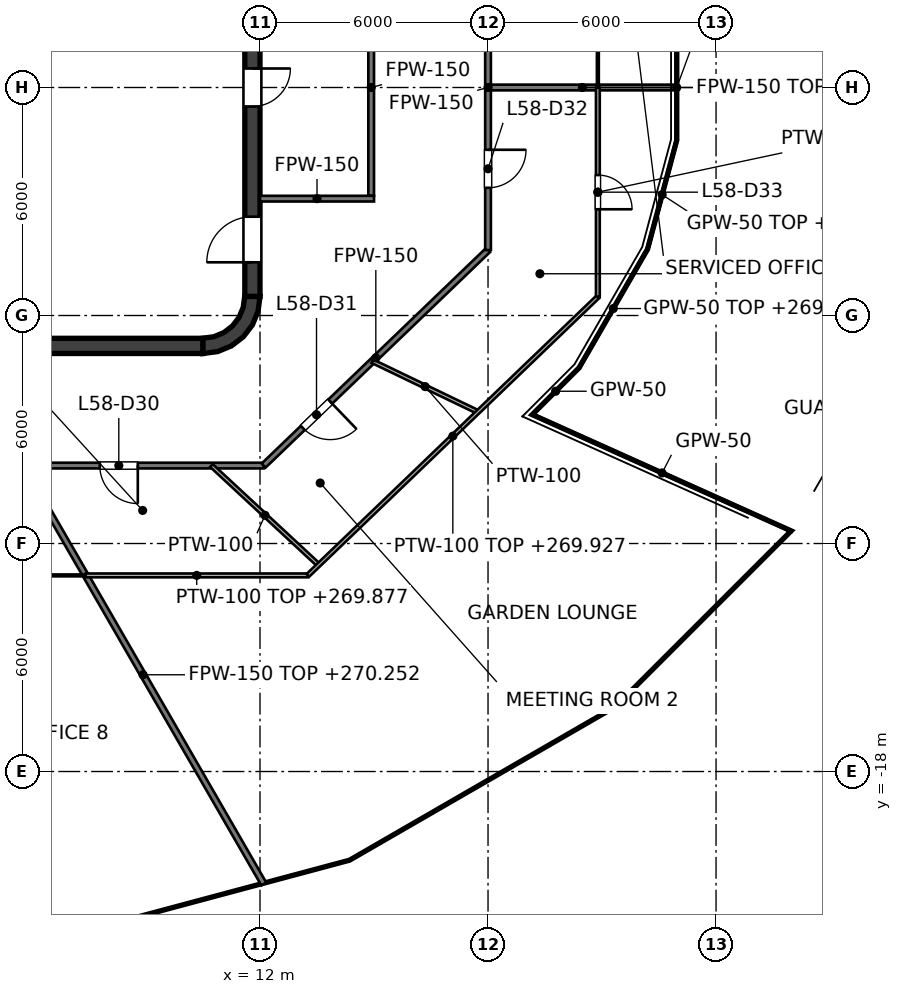
"""IFC4 building model, lengths in metres.
Left out: names, types, materials, properties, quantities, classifications, styles, units other than length and angle.
Written with IfcOpenShell. Run it as: python <this file> out.ifc"""

import sys

from ifc_helpers import new_model, si_unit, direction, frame, frame_2d, origin, place, context, subcontext, project, spatial, polyline, rectangle, outline, extrude, element, fill, save


model = new_model("IFC4")
c1 = context("Model", 3, precision=1e-05, world=origin(), true_north=direction((0.0, 1.0)))
c2 = subcontext(c1, "Body", "Model", "MODEL_VIEW")
j1 = project(units=[si_unit("LENGTHUNIT", "METRE"), si_unit("PLANEANGLEUNIT", "RADIAN")], contexts=[c1])
p1 = place(None, origin())
s1 = spatial("IfcSite", under=j1, at=p1, CompositionType="ELEMENT")
p2 = place(p1, origin())
s2 = spatial("IfcBuilding", under=s1, at=p2, CompositionType="ELEMENT")
p3 = place(p2, frame((0.0, 0.0, 267.0)))
s3 = spatial("IfcBuildingStorey", under=s2, at=p3, CompositionType="ELEMENT", Elevation=267.0)
p4 = place(p3, frame((-10.5, -6.8, 0.0), z_axis=(0.0, 0.0, 1.0), x_axis=(1.0, 0.0, 0.0)))
e1 = element("IfcWall", 1, at=p4, inside=s3, PredefinedType="SHEAR", context=c2, shape_type="SweptSolid", body=[
    extrude(rectangle(XDim=21.0, YDim=0.4, at=frame_2d((10.5, 0.0))), origin(), (0.0, 0.0, 1.0), 4.0),
])
p5 = place(p3, frame((11.8, -5.5, 0.0), z_axis=(0.0, 0.0, 1.0), x_axis=(0.0, 1.0, 0.0)))
e2 = element("IfcWall", 2, at=p5, inside=s3, PredefinedType="SHEAR", context=c2, shape_type="SweptSolid", body=[
    extrude(rectangle(XDim=11.0, YDim=0.4, at=frame_2d((5.5, 0.0))), origin(), (0.0, 0.0, 1.0), 4.0),
])
p6 = place(p5, frame((5.0, 0.0, 0.0)))
e3 = element("IfcOpeningElement", 3, at=p6, cuts=e2, PredefinedType="OPENING", context=c2, shape_type="SweptSolid", body=[
    extrude(rectangle(XDim=1.0, YDim=2.1, at=frame_2d((0.5, 1.05))), frame((0.0, 0.2, 0.0), z_axis=(0.0, -1.0, 0.0), x_axis=(1.0, 0.0, 0.0)), (0.0, 0.0, 1.0), 0.4),
])
p7 = place(p5, frame((0.9, 0.0, 0.0)))
e4 = element("IfcOpeningElement", 4, at=p7, cuts=e2, PredefinedType="OPENING", context=c2, shape_type="SweptSolid", body=[
    extrude(rectangle(XDim=1.2, YDim=2.1, at=frame_2d((0.6, 1.05))), frame((0.0, 0.2, 0.0), z_axis=(0.0, -1.0, 0.0), x_axis=(1.0, 0.0, 0.0)), (0.0, 0.0, 1.0), 0.4),
])
p8 = place(p5, frame((8.9, 0.0, 0.0)))
e5 = element("IfcOpeningElement", 5, at=p8, cuts=e2, PredefinedType="OPENING", context=c2, shape_type="SweptSolid", body=[
    extrude(rectangle(XDim=1.2, YDim=2.1, at=frame_2d((0.6, 1.05))), frame((0.0, 0.2, 0.0), z_axis=(0.0, -1.0, 0.0), x_axis=(1.0, 0.0, 0.0)), (0.0, 0.0, 1.0), 0.4),
])
p9 = place(p3, origin())
e6 = element("IfcWall", 6, at=p9, inside=s3, PredefinedType="SHEAR", context=c2, shape_type="SweptSolid", body=[
    extrude(outline(polyline([(12.0, -5.5), (11.596, -5.5), (11.559, -5.784), (11.45, -6.048), (11.275, -6.275), (11.048, -6.45), (10.784, -6.559), (10.5, -6.596), (10.5, -7.0), (10.888, -6.949), (11.25, -6.799), (11.561, -6.561), (11.799, -6.25), (11.949, -5.888), (12.0, -5.5)])), origin(), (0.0, 0.0, 1.0), 4.0),
])
p10 = place(p3, frame((9.0, -6.6, 0.0), z_axis=(0.0, 0.0, 1.0), x_axis=(0.0, 1.0, 0.0)))
e7 = element("IfcWall", 7, at=p10, inside=s3, PredefinedType="SOLIDWALL", context=c2, shape_type="SweptSolid", body=[
    extrude(rectangle(XDim=2.5, YDim=0.25, at=frame_2d((1.25, 0.0))), origin(), (0.0, 0.0, 1.0), 3.85),
])
p11 = place(p10, frame((0.65, 0.0, 0.0)))
e8 = element("IfcOpeningElement", 8, at=p11, cuts=e7, PredefinedType="OPENING", context=c2, shape_type="SweptSolid", body=[
    extrude(rectangle(XDim=1.2, YDim=2.1, at=frame_2d((0.6, 1.05))), frame((0.0, 0.125, 0.0), z_axis=(0.0, -1.0, 0.0), x_axis=(1.0, 0.0, 0.0)), (0.0, 0.0, 1.0), 0.25),
])
p12 = place(p3, frame((-9.125, -1.525, 0.0), z_axis=(0.0, 0.0, 1.0), x_axis=(1.0, 0.0, 0.0)))
e9 = element("IfcWall", 9, at=p12, inside=s3, PredefinedType="SOLIDWALL", context=c2, shape_type="SweptSolid", body=[
    extrude(rectangle(XDim=18.25, YDim=0.25, at=frame_2d((9.125, 0.0))), origin(), (0.0, 0.0, 1.0), 3.85),
])
p13 = place(p12, frame((7.15, 0.0, 0.0)))
e10 = element("IfcOpeningElement", 10, at=p13, cuts=e9, PredefinedType="OPENING", context=c2, shape_type="SweptSolid", body=[
    extrude(rectangle(XDim=1.2, YDim=2.1, at=frame_2d((0.6, 1.05))), frame((0.0, 0.125, 0.0), z_axis=(0.0, -1.0, 0.0), x_axis=(1.0, 0.0, 0.0)), (0.0, 0.0, 1.0), 0.25),
])
p14 = place(p12, frame((10.2, 0.0, 0.0)))
e11 = element("IfcOpeningElement", 11, at=p14, cuts=e9, PredefinedType="OPENING", context=c2, shape_type="SweptSolid", body=[
    extrude(rectangle(XDim=1.2, YDim=2.1, at=frame_2d((0.6, 1.05))), frame((0.0, 0.125, 0.0), z_axis=(0.0, -1.0, 0.0), x_axis=(1.0, 0.0, 0.0)), (0.0, 0.0, 1.0), 0.25),
])
p15 = place(p12, frame((16.075, 0.0, 0.0)))
e12 = element("IfcOpeningElement", 12, at=p15, cuts=e9, PredefinedType="OPENING", context=c2, shape_type="SweptSolid", body=[
    extrude(rectangle(XDim=1.0, YDim=2.1, at=frame_2d((0.5, 1.05))), frame((0.0, 0.125, 0.0), z_axis=(0.0, -1.0, 0.0), x_axis=(1.0, 0.0, 0.0)), (0.0, 0.0, 1.0), 0.25),
])
p16 = place(p3, frame((3.275, -3.975, 0.0), z_axis=(0.0, 0.0, 1.0), x_axis=(1.0, 0.0, 0.0)))
e13 = element("IfcWall", 13, at=p16, inside=s3, PredefinedType="SOLIDWALL", context=c2, shape_type="SweptSolid", body=[
    extrude(rectangle(XDim=5.85, YDim=0.25, at=frame_2d((2.925, 0.0))), origin(), (0.0, 0.0, 1.0), 3.85),
])
p17 = place(p3, frame((9.0, -3.85, 0.0), z_axis=(0.0, 0.0, 1.0), x_axis=(0.0, 1.0, 0.0)))
e14 = element("IfcWall", 14, at=p17, inside=s3, PredefinedType="SOLIDWALL", context=c2, shape_type="SweptSolid", body=[
    extrude(rectangle(XDim=2.2, YDim=0.25, at=frame_2d((1.1, 0.0))), origin(), (0.0, 0.0, 1.0), 3.85),
])
p18 = place(p3, frame((14.925, -2.85, 0.0), z_axis=(0.0, 0.0, 1.0), x_axis=(0.0, 1.0, 0.0)))
e15 = element("IfcWall", 15, at=p18, inside=s3, PredefinedType="PARTITIONING", context=c2, shape_type="SweptSolid", body=[
    extrude(rectangle(XDim=5.7, YDim=0.15, at=frame_2d((2.85, 0.0))), origin(), (0.0, 0.0, 1.0), 2.918),
])
p19 = place(p3, frame((12.0, -2.925, 0.0), z_axis=(0.0, 0.0, 1.0), x_axis=(1.0, 0.0, 0.0)))
e16 = element("IfcWall", 16, at=p19, inside=s3, PredefinedType="PARTITIONING", context=c2, shape_type="SweptSolid", body=[
    extrude(rectangle(XDim=3.0, YDim=0.15, at=frame_2d((1.5, 0.0))), origin(), (0.0, 0.0, 1.0), 2.918),
])
p20 = place(p3, frame((5.744, -9.949, 0.0), z_axis=(0.0, 0.0, 1.0), x_axis=(0.499937454569, -0.866061511395, 0.0)))
e17 = element("IfcWall", 17, at=p20, inside=s3, PredefinedType="PARTITIONING", context=c2, shape_type="SweptSolid", body=[
    extrude(rectangle(XDim=12.713, YDim=0.15, at=frame_2d((6.356, 0.0))), origin(), (0.0, 0.0, 1.0), 3.252),
])
p21 = place(p3, frame((-12.095, -9.949, 0.0), z_axis=(0.0, 0.0, 1.0), x_axis=(1.0, 0.0, 0.0)))
e18 = element("IfcWall", 18, at=p21, inside=s3, PredefinedType="PARTITIONING", context=c2, shape_type="SweptSolid", body=[
    extrude(rectangle(XDim=24.19, YDim=0.15, at=frame_2d((12.095, 0.0))), origin(), (0.0, 0.0, 1.0), 2.877),
])
p22 = place(p21, frame((0.573, 0.0, 0.0)))
e19 = element("IfcOpeningElement", 19, at=p22, cuts=e18, PredefinedType="OPENING", context=c2, shape_type="SweptSolid", body=[
    extrude(rectangle(XDim=1.0, YDim=2.1, at=frame_2d((0.5, 1.05))), frame((0.0, 0.075, 0.0), z_axis=(0.0, -1.0, 0.0), x_axis=(1.0, 0.0, 0.0)), (0.0, 0.0, 1.0), 0.15),
])
p23 = place(p21, frame((5.966, 0.0, 0.0)))
e20 = element("IfcOpeningElement", 20, at=p23, cuts=e18, PredefinedType="OPENING", context=c2, shape_type="SweptSolid", body=[
    extrude(rectangle(XDim=1.0, YDim=2.1, at=frame_2d((0.5, 1.05))), frame((0.0, 0.075, 0.0), z_axis=(0.0, -1.0, 0.0), x_axis=(1.0, 0.0, 0.0)), (0.0, 0.0, 1.0), 0.15),
])
p24 = place(p21, frame((13.812, 0.0, 0.0)))
e21 = element("IfcOpeningElement", 21, at=p24, cuts=e18, PredefinedType="OPENING", context=c2, shape_type="SweptSolid", body=[
    extrude(rectangle(XDim=1.0, YDim=2.1, at=frame_2d((0.5, 1.05))), frame((0.0, 0.075, 0.0), z_axis=(0.0, -1.0, 0.0), x_axis=(1.0, 0.0, 0.0)), (0.0, 0.0, 1.0), 0.15),
])
p25 = place(p21, frame((19.879, 0.0, 0.0)))
e22 = element("IfcOpeningElement", 22, at=p25, cuts=e18, PredefinedType="OPENING", context=c2, shape_type="SweptSolid", body=[
    extrude(rectangle(XDim=1.0, YDim=2.1, at=frame_2d((0.5, 1.05))), frame((0.0, 0.075, 0.0), z_axis=(0.0, -1.0, 0.0), x_axis=(1.0, 0.0, 0.0)), (0.0, 0.0, 1.0), 0.15),
])
p26 = place(p3, frame((18.0, 0.0, 0.0), z_axis=(0.0, 0.0, 1.0), x_axis=(1.0, 0.0, 0.0)))
e23 = element("IfcWall", 23, at=p26, inside=s3, PredefinedType="PARTITIONING", context=c2, shape_type="SweptSolid", body=[
    extrude(rectangle(XDim=4.966, YDim=0.15, at=frame_2d((2.483, 0.0))), origin(), (0.0, 0.0, 1.0), 2.927),
])
p27 = place(p3, frame((12.095, -9.949, 0.0), z_axis=(0.0, 0.0, 1.0), x_axis=(0.721260976692, 0.69266341285, 0.0)))
e24 = element("IfcWall", 24, at=p27, inside=s3, PredefinedType="PARTITIONING", context=c2, shape_type="SweptSolid", body=[
    extrude(rectangle(XDim=8.187, YDim=0.15, at=frame_2d((4.094, 0.0))), origin(), (0.0, 0.0, 1.0), 2.918),
])
p28 = place(p27, frame((1.43, 0.0, 0.0)))
e25 = element("IfcOpeningElement", 25, at=p28, cuts=e24, PredefinedType="OPENING", context=c2, shape_type="SweptSolid", body=[
    extrude(rectangle(XDim=1.0, YDim=2.1, at=frame_2d((0.5, 1.05))), frame((0.0, 0.075, 0.0), z_axis=(0.0, -1.0, 0.0), x_axis=(1.0, 0.0, 0.0)), (0.0, 0.0, 1.0), 0.15),
])
p29 = place(p3, frame((18.0, -4.278, 0.0), z_axis=(0.0, 0.0, 1.0), x_axis=(0.0, 1.0, 0.0)))
e26 = element("IfcWall", 26, at=p29, inside=s3, PredefinedType="PARTITIONING", context=c2, shape_type="SweptSolid", body=[
    extrude(rectangle(XDim=8.556, YDim=0.15, at=frame_2d((4.278, 0.0))), origin(), (0.0, 0.0, 1.0), 2.918),
])
p30 = place(p29, frame((1.639, 0.0, 0.0)))
e27 = element("IfcOpeningElement", 27, at=p30, cuts=e26, PredefinedType="OPENING", context=c2, shape_type="SweptSolid", body=[
    extrude(rectangle(XDim=1.0, YDim=2.1, at=frame_2d((0.5, 1.05))), frame((0.0, 0.075, 0.0), z_axis=(0.0, -1.0, 0.0), x_axis=(1.0, 0.0, 0.0)), (0.0, 0.0, 1.0), 0.15),
])
p31 = place(p29, frame((5.917, 0.0, 0.0)))
e28 = element("IfcOpeningElement", 28, at=p31, cuts=e26, PredefinedType="OPENING", context=c2, shape_type="SweptSolid", body=[
    extrude(rectangle(XDim=1.0, YDim=2.1, at=frame_2d((0.5, 1.05))), frame((0.0, 0.075, 0.0), z_axis=(0.0, -1.0, 0.0), x_axis=(1.0, 0.0, 0.0)), (0.0, 0.0, 1.0), 0.15),
])
p32 = place(p3, frame((19.164, -8.608, 0.0), z_axis=(0.0, 0.0, 1.0), x_axis=(0.912165340302, -0.409822390741, 0.0)))
e29 = element("IfcWall", 29, at=p32, inside=s3, PredefinedType="PARTITIONING", context=c2, shape_type="SweptSolid", body=[
    extrude(rectangle(XDim=7.489, YDim=0.05, at=frame_2d((3.744, 0.0))), origin(), (0.0, 0.0, 1.0), 2.927),
])
p33 = place(p3, frame((-12.839, -12.839, 0.0), z_axis=(0.0, 0.0, 1.0), x_axis=(1.0, 0.0, 0.0)))
e30 = element("IfcWall", 30, at=p33, inside=s3, PredefinedType="PARTITIONING", context=c2, shape_type="SweptSolid", body=[
    extrude(rectangle(XDim=20.251, YDim=0.05, at=frame_2d((10.125, 0.0))), origin(), (0.0, 0.0, 1.0), 2.877),
])
p34 = place(p33, frame((4.149, 0.0, 0.0)))
e31 = element("IfcOpeningElement", 31, at=p34, cuts=e30, PredefinedType="OPENING", context=c2, shape_type="SweptSolid", body=[
    extrude(rectangle(XDim=1.0, YDim=2.1, at=frame_2d((0.5, 1.05))), frame((0.0, 0.025, 0.0), z_axis=(0.0, -1.0, 0.0), x_axis=(1.0, 0.0, 0.0)), (0.0, 0.0, 1.0), 0.05),
])
p35 = place(p33, frame((15.15, 0.0, 0.0)))
e32 = element("IfcOpeningElement", 32, at=p35, cuts=e30, PredefinedType="OPENING", context=c2, shape_type="SweptSolid", body=[
    extrude(rectangle(XDim=1.0, YDim=2.1, at=frame_2d((0.5, 1.05))), frame((0.0, 0.025, 0.0), z_axis=(0.0, -1.0, 0.0), x_axis=(1.0, 0.0, 0.0)), (0.0, 0.0, 1.0), 0.05),
])
p36 = place(p3, frame((19.164, -8.608, 0.0), z_axis=(0.0, 0.0, 1.0), x_axis=(0.707106781187, 0.707106781187, 0.0)))
e33 = element("IfcWall", 33, at=p36, inside=s3, PredefinedType="PARTITIONING", context=c2, shape_type="SweptSolid", body=[
    extrude(rectangle(XDim=1.74, YDim=0.05, at=frame_2d((0.87, 0.0))), origin(), (0.0, 0.0, 1.0), 2.927),
])
p37 = place(p3, frame((20.394, -7.378, 0.0), z_axis=(0.0, 0.0, 1.0), x_axis=(0.500123016475, 0.865954368539, 0.0)))
e34 = element("IfcWall", 34, at=p37, inside=s3, PredefinedType="PARTITIONING", context=c2, shape_type="SweptSolid", body=[
    extrude(rectangle(XDim=3.605, YDim=0.05, at=frame_2d((1.802, 0.0))), origin(), (0.0, 0.0, 1.0), 2.918),
])
p38 = place(p3, frame((22.197, -4.256, 0.0), z_axis=(0.0, 0.0, 1.0), x_axis=(0.258736085224, 0.965948051503, 0.0)))
e35 = element("IfcWall", 35, at=p38, inside=s3, PredefinedType="PARTITIONING", context=c2, shape_type="SweptSolid", body=[
    extrude(rectangle(XDim=2.972, YDim=0.05, at=frame_2d((1.486, 0.0))), origin(), (0.0, 0.0, 1.0), 2.918),
])
p39 = place(p3, frame((22.966, -1.385, 0.0), z_axis=(0.0, 0.0, 1.0), x_axis=(0.0, 1.0, 0.0)))
e36 = element("IfcWall", 36, at=p39, inside=s3, PredefinedType="PARTITIONING", context=c2, shape_type="SweptSolid", body=[
    extrude(rectangle(XDim=2.77, YDim=0.05, at=frame_2d((1.385, 0.0))), origin(), (0.0, 0.0, 1.0), 2.927),
])
p40 = place(p3, frame((20.89, 0.0, 0.0), z_axis=(0.0, 0.0, 1.0), x_axis=(0.0, 1.0, 0.0)))
e37 = element("IfcWall", 37, at=p40, inside=s3, PredefinedType="PARTITIONING", context=c2, shape_type="SweptSolid", body=[
    extrude(rectangle(XDim=5.509, YDim=0.05, at=frame_2d((2.754, 0.0))), origin(), (0.0, 0.0, 1.0), 2.918),
])
p41 = place(p40, frame((2.204, 0.0, 0.0)))
e38 = element("IfcOpeningElement", 38, at=p41, cuts=e37, PredefinedType="OPENING", context=c2, shape_type="SweptSolid", body=[
    extrude(rectangle(XDim=1.0, YDim=2.1, at=frame_2d((0.5, 1.05))), frame((0.0, 0.025, 0.0), z_axis=(0.0, -1.0, 0.0), x_axis=(1.0, 0.0, 0.0)), (0.0, 0.0, 1.0), 0.05),
])
p42 = place(p3, frame((10.722, -9.949, 0.0), z_axis=(0.0, 0.0, 1.0), x_axis=(0.733012690733, -0.680214962511, 0.0)))
e39 = element("IfcWall", 39, at=p42, inside=s3, PredefinedType="PARTITIONING", context=c2, shape_type="SweptSolid", body=[
    extrude(rectangle(XDim=3.847, YDim=0.1, at=frame_2d((1.924, 0.0))), origin(), (0.0, 0.0, 1.0), 3.85),
])
p43 = place(p3, frame((14.955, -7.202, 0.0), z_axis=(0.0, 0.0, 1.0), x_axis=(0.900977603602, -0.433865598783, 0.0)))
e40 = element("IfcWall", 40, at=p43, inside=s3, PredefinedType="PARTITIONING", context=c2, shape_type="SweptSolid", body=[
    extrude(rectangle(XDim=3.084, YDim=0.1, at=frame_2d((1.542, 0.0))), origin(), (0.0, 0.0, 1.0), 3.85),
])
p44 = place(p3, frame((7.412, -12.839, 0.0), z_axis=(0.0, 0.0, 1.0), x_axis=(1.0, 0.0, 0.0)))
e41 = element("IfcWall", 41, at=p44, inside=s3, PredefinedType="PARTITIONING", context=c2, shape_type="SweptSolid", body=[
    extrude(rectangle(XDim=5.846, YDim=0.1, at=frame_2d((2.923, 0.0))), origin(), (0.0, 0.0, 1.0), 2.877),
])
p45 = place(p3, frame((13.258, -12.839, 0.0), z_axis=(0.0, 0.0, 1.0), x_axis=(0.721209796007, 0.692716702659, 0.0)))
e42 = element("IfcWall", 42, at=p45, inside=s3, PredefinedType="PARTITIONING", context=c2, shape_type="SweptSolid", body=[
    extrude(rectangle(XDim=10.582, YDim=0.1, at=frame_2d((5.291, 0.0))), origin(), (0.0, 0.0, 1.0), 2.927),
])
p46 = place(p3, frame((20.89, -5.509, 0.0), z_axis=(0.0, 0.0, 1.0), x_axis=(0.0, 1.0, 0.0)))
e43 = element("IfcWall", 43, at=p46, inside=s3, PredefinedType="PARTITIONING", context=c2, shape_type="SweptSolid", body=[
    extrude(rectangle(XDim=5.509, YDim=0.1, at=frame_2d((2.754, 0.0))), origin(), (0.0, 0.0, 1.0), 2.918),
])
p47 = place(p46, frame((2.304, 0.0, 0.0)))
e44 = element("IfcOpeningElement", 44, at=p47, cuts=e43, PredefinedType="OPENING", context=c2, shape_type="SweptSolid", body=[
    extrude(rectangle(XDim=0.9, YDim=2.1, at=frame_2d((0.45, 1.05))), frame((0.0, 0.05, 0.0), z_axis=(0.0, -1.0, 0.0), x_axis=(1.0, 0.0, 0.0)), (0.0, 0.0, 1.0), 0.1),
])
p48 = place(p11, origin())
e45 = element("IfcDoor", 45, at=p48, inside=s3, OperationType="SINGLE_SWING_LEFT", PredefinedType="DOOR", context=c2, shape_type="SweptSolid", body=[
    extrude(rectangle(XDim=1.2, YDim=2.1, at=frame_2d((0.6, 1.05))), frame((0.0, 0.025, 0.0), z_axis=(0.0, -1.0, 0.0), x_axis=(1.0, 0.0, 0.0)), (0.0, 0.0, 1.0), 0.05),
])
fill(e8, e45)
p49 = place(p15, origin())
e46 = element("IfcDoor", 46, at=p49, inside=s3, OperationType="SINGLE_SWING_RIGHT", PredefinedType="DOOR", context=c2, shape_type="SweptSolid", body=[
    extrude(rectangle(XDim=1.0, YDim=2.1, at=frame_2d((0.5, 1.05))), frame((0.0, 0.025, 0.0), z_axis=(0.0, -1.0, 0.0), x_axis=(1.0, 0.0, 0.0)), (0.0, 0.0, 1.0), 0.05),
])
fill(e12, e46)
p50 = place(p6, origin())
e47 = element("IfcDoor", 47, at=p50, inside=s3, OperationType="SINGLE_SWING_RIGHT", PredefinedType="DOOR", context=c2, shape_type="SweptSolid", body=[
    extrude(rectangle(XDim=1.0, YDim=2.1, at=frame_2d((0.5, 1.05))), frame((0.0, 0.025, 0.0), z_axis=(0.0, -1.0, 0.0), x_axis=(1.0, 0.0, 0.0)), (0.0, 0.0, 1.0), 0.05),
])
fill(e3, e47)
p51 = place(p7, origin())
e48 = element("IfcDoor", 48, at=p51, inside=s3, OperationType="SINGLE_SWING_LEFT", PredefinedType="DOOR", context=c2, shape_type="SweptSolid", body=[
    extrude(rectangle(XDim=1.2, YDim=2.1, at=frame_2d((0.6, 1.05))), frame((0.0, 0.025, 0.0), z_axis=(0.0, -1.0, 0.0), x_axis=(1.0, 0.0, 0.0)), (0.0, 0.0, 1.0), 0.05),
])
fill(e4, e48)
p52 = place(p25, origin())
e49 = element("IfcDoor", 49, at=p52, inside=s3, OperationType="SINGLE_SWING_RIGHT", PredefinedType="DOOR", context=c2, shape_type="SweptSolid", body=[
    extrude(rectangle(XDim=1.0, YDim=2.1, at=frame_2d((0.5, 1.05))), frame((0.0, 0.025, 0.0), z_axis=(0.0, -1.0, 0.0), x_axis=(1.0, 0.0, 0.0)), (0.0, 0.0, 1.0), 0.05),
])
fill(e22, e49)
p53 = place(p28, origin())
e50 = element("IfcDoor", 50, at=p53, inside=s3, OperationType="SINGLE_SWING_RIGHT", PredefinedType="DOOR", context=c2, shape_type="SweptSolid", body=[
    extrude(rectangle(XDim=1.0, YDim=2.1, at=frame_2d((0.5, 1.05))), frame((0.0, 0.025, 0.0), z_axis=(0.0, -1.0, 0.0), x_axis=(1.0, 0.0, 0.0)), (0.0, 0.0, 1.0), 0.05),
])
fill(e25, e50)
p54 = place(p30, origin())
e51 = element("IfcDoor", 51, at=p54, inside=s3, OperationType="SINGLE_SWING_RIGHT", PredefinedType="DOOR", context=c2, shape_type="SweptSolid", body=[
    extrude(rectangle(XDim=1.0, YDim=2.1, at=frame_2d((0.5, 1.05))), frame((0.0, 0.025, 0.0), z_axis=(0.0, -1.0, 0.0), x_axis=(1.0, 0.0, 0.0)), (0.0, 0.0, 1.0), 0.05),
])
fill(e27, e51)
p55 = place(p47, origin())
e52 = element("IfcDoor", 52, at=p55, inside=s3, OperationType="SINGLE_SWING_LEFT", PredefinedType="DOOR", context=c2, shape_type="SweptSolid", body=[
    extrude(rectangle(XDim=0.9, YDim=2.1, at=frame_2d((0.45, 1.05))), frame((0.0, 0.025, 0.0), z_axis=(0.0, -1.0, 0.0), x_axis=(1.0, 0.0, 0.0)), (0.0, 0.0, 1.0), 0.05),
])
fill(e44, e52)
save(model, sys.argv[1])
